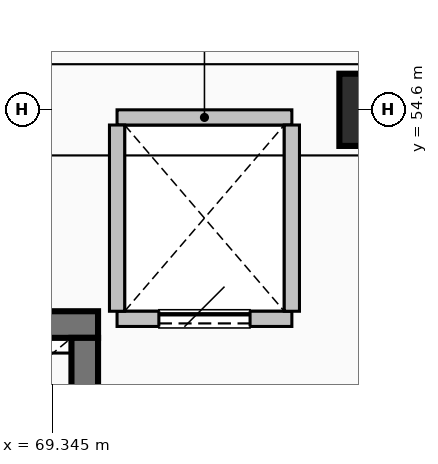
"""IFC4 building model, lengths in metres.
Left out: names, types, materials, properties, quantities, classifications, styles, units other than length and angle.
Written with IfcOpenShell. Run it as: python <this file> out.ifc"""

import sys

from ifc_helpers import new_model, si_unit, direction, frame, frame_2d, origin, origin_2d, place, context, subcontext, project, spatial, rectangle, extrude, element, fill, save


model = new_model("IFC4")
c1 = context("Model", 3, precision=1e-05, world=origin(), true_north=direction((0.0, 1.0)))
c2 = subcontext(c1, "Body", "Model", "MODEL_VIEW")
j1 = project(units=[si_unit("LENGTHUNIT", "METRE"), si_unit("PLANEANGLEUNIT", "RADIAN")], contexts=[c1])
p1 = place(None, origin())
s1 = spatial("IfcSite", under=j1, at=p1, CompositionType="ELEMENT")
p2 = place(p1, origin())
s2 = spatial("IfcBuilding", under=s1, at=p2, CompositionType="ELEMENT")
p3 = place(p2, origin())
s3 = spatial("IfcBuildingStorey", under=s2, at=p3, CompositionType="ELEMENT", Elevation=0.0)
p4 = place(p3, frame((73.6, 54.6, 0.0), z_axis=(0.0, 0.0, 1.0), x_axis=(1.0, 0.0, 0.0)))
e1 = element("IfcColumn", 1, at=p4, inside=s3, PredefinedType="COLUMN", context=c2, shape_type="SweptSolid", body=[
    extrude(rectangle(XDim=0.95, YDim=0.95, at=origin_2d()), origin(), (0.0, 0.0, 1.0), 5.4),
])
p5 = place(p3, frame((69.95, 51.775, 0.0), z_axis=(0.0, 0.0, 1.0), x_axis=(-1.0, 0.0, 0.0)))
e2 = element("IfcWall", 2, at=p5, inside=s3, PredefinedType="SHEAR", context=c2, shape_type="SweptSolid", body=[
    extrude(rectangle(XDim=8.5, YDim=0.35, at=frame_2d((4.25, 0.0))), origin(), (0.0, 0.0, 1.0), 5.1),
])
p6 = place(p3, frame((69.775, 51.6, 0.0), z_axis=(0.0, 0.0, 1.0), x_axis=(0.0, -1.0, 0.0)))
e3 = element("IfcWall", 3, at=p6, inside=s3, PredefinedType="SHEAR", context=c2, shape_type="SweptSolid", body=[
    extrude(rectangle(XDim=3.8, YDim=0.35, at=frame_2d((1.9, 0.0))), origin(), (0.0, 0.0, 1.0), 5.1),
])
p7 = place(p3, frame((70.2, 51.85, 0.0), z_axis=(0.0, 0.0, 1.0), x_axis=(1.0, 0.0, 0.0)))
e4 = element("IfcWall", 4, at=p7, inside=s3, PredefinedType="PARTITIONING", context=c2, shape_type="SweptSolid", body=[
    extrude(rectangle(XDim=2.3, YDim=0.2, at=frame_2d((1.15, 0.0))), origin(), (0.0, 0.0, 1.0), 5.092),
])
p8 = place(p7, frame((0.55, 0.0, 0.0)))
e5 = element("IfcOpeningElement", 5, at=p8, cuts=e4, PredefinedType="OPENING", context=c2, shape_type="SweptSolid", body=[
    extrude(rectangle(XDim=1.2, YDim=2.15, at=frame_2d((0.6, 1.075))), frame((0.0, 0.11, 0.0), z_axis=(0.0, -1.0, 0.0), x_axis=(1.0, 0.0, 0.0)), (0.0, 0.0, 1.0), 0.22),
])
p9 = place(p3, frame((72.5, 54.5, 0.0), z_axis=(0.0, 0.0, 1.0), x_axis=(-1.0, 0.0, 0.0)))
e6 = element("IfcWall", 6, at=p9, inside=s3, PredefinedType="PARTITIONING", context=c2, shape_type="SweptSolid", body=[
    extrude(rectangle(XDim=2.3, YDim=0.2, at=frame_2d((1.15, 0.0))), origin(), (0.0, 0.0, 1.0), 4.342),
])
for number, where, z_axis, x_axis in (
    (7, (70.2, 51.95, 0.0), (0.0, 0.0, 1.0), (0.0, 1.0, 0.0)),
    (8, (72.5, 54.4, 0.0), (0.0, 0.0, 1.0), (0.0, -1.0, 0.0)),
):
    element("IfcWall", number, at=place(p3, frame(where, z_axis=z_axis, x_axis=x_axis)), inside=s3, PredefinedType="PARTITIONING", context=c2, shape_type="SweptSolid", body=[
        extrude(rectangle(XDim=2.45, YDim=0.2, at=frame_2d((1.225, 0.0))), origin(), (0.0, 0.0, 1.0), 5.092),
    ])
p10 = place(p8, origin())
e9 = element("IfcDoor", 9, at=p10, inside=s3, OperationType="SLIDING_TO_LEFT", PredefinedType="DOOR", context=c2, shape_type="SweptSolid", body=[
    extrude(rectangle(XDim=1.2, YDim=2.15, at=frame_2d((0.6, 1.075))), frame((0.0, 0.025, 0.0), z_axis=(0.0, -1.0, 0.0), x_axis=(1.0, 0.0, 0.0)), (0.0, 0.0, 1.0), 0.05),
])
fill(e5, e9)
save(model, sys.argv[1])
